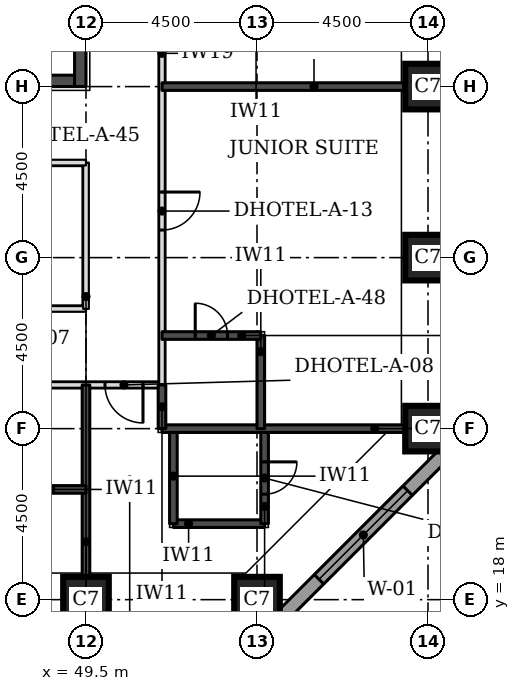
"""IFC4 building model, lengths in metres.
Left out: names, types, materials, properties, quantities, classifications, styles, units other than length and angle.
Written with IfcOpenShell. Run it as: python <this file> out.ifc"""

import sys

from ifc_helpers import new_model, si_unit, direction, frame, frame_2d, origin, origin_2d, place, context, subcontext, project, spatial, rectangle, extrude, element, fill, save


model = new_model("IFC4")
c1 = context("Model", 3, precision=1e-05, world=origin(), true_north=direction((0.0, 1.0)))
c2 = subcontext(c1, "Body", "Model", "MODEL_VIEW")
j1 = project(units=[si_unit("LENGTHUNIT", "METRE"), si_unit("PLANEANGLEUNIT", "RADIAN")], contexts=[c1])
p1 = place(None, origin())
s1 = spatial("IfcSite", under=j1, at=p1, CompositionType="ELEMENT")
p2 = place(p1, origin())
s2 = spatial("IfcBuilding", under=s1, at=p2, CompositionType="ELEMENT")
p3 = place(p2, frame((0.0, 0.0, 26.4)))
s3 = spatial("IfcBuildingStorey", under=s2, at=p3, CompositionType="ELEMENT", Elevation=26.4)
for number, where, z_axis, x_axis in (
    (1, (49.5, 18.0, 0.0), (0.0, 0.0, 1.0), (1.0, 0.0, 0.0)),
    (2, (54.0, 18.0, 0.0), (0.0, 0.0, 1.0), (1.0, 0.0, 0.0)),
    (3, (58.5, 22.5, 0.0), (0.0, 0.0, 1.0), (1.0, 0.0, 0.0)),
    (4, (58.5, 27.0, 0.0), (0.0, 0.0, 1.0), (1.0, 0.0, 0.0)),
    (5, (58.5, 31.5, 0.0), (0.0, 0.0, 1.0), (1.0, 0.0, 0.0)),
):
    element("IfcColumn", number, at=place(p3, frame(where, z_axis=z_axis, x_axis=x_axis)), inside=s3, PredefinedType="COLUMN", context=c2, shape_type="SweptSolid", body=[
        extrude(rectangle(XDim=1.2, YDim=1.2, at=origin_2d()), origin(), (0.0, 0.0, 1.0), 3.3),
    ])
p4 = place(p3, frame((40.8, 31.65, 0.0), z_axis=(0.0, 0.0, 1.0), x_axis=(1.0, 0.0, 0.0)))
e6 = element("IfcWall", 6, at=p4, inside=s3, PredefinedType="SHEAR", context=c2, shape_type="SweptSolid", body=[
    extrude(rectangle(XDim=8.4, YDim=0.3, at=frame_2d((4.2, 0.0))), origin(), (0.0, 0.0, 1.0), 3.3),
])
p5 = place(p4, frame((5.2, 0.0, 0.0)))
e7 = element("IfcOpeningElement", 7, at=p5, cuts=e6, PredefinedType="OPENING", context=c2, shape_type="SweptSolid", body=[
    extrude(rectangle(XDim=1.0, YDim=2.1, at=frame_2d((0.5, 1.05))), frame((0.0, 0.16, 0.0), z_axis=(0.0, -1.0, 0.0), x_axis=(1.0, 0.0, 0.0)), (0.0, 0.0, 1.0), 0.32),
])
p6 = place(p3, frame((49.35, 31.5, 0.0), z_axis=(0.0, 0.0, 1.0), x_axis=(0.0, 1.0, 0.0)))
e8 = element("IfcWall", 8, at=p6, inside=s3, PredefinedType="SHEAR", context=c2, shape_type="SweptSolid", body=[
    extrude(rectangle(XDim=9.0, YDim=0.3, at=frame_2d((4.5, 0.0))), origin(), (0.0, 0.0, 1.0), 3.3),
])
p7 = place(p3, frame((54.27, 17.174, 0.0), z_axis=(0.0, 0.0, 1.0), x_axis=(0.707106781187, 0.707106781187, 0.0)))
e9 = element("IfcWall", 9, at=p7, inside=s3, PredefinedType="STANDARD", context=c2, shape_type="SweptSolid", body=[
    extrude(rectangle(XDim=7.151, YDim=0.35, at=frame_2d((3.576, 0.0))), origin(), (0.0, 0.0, 1.0), 3.055),
])
p8 = place(p7, frame((1.926, 0.0, 0.8)))
e10 = element("IfcOpeningElement", 10, at=p8, cuts=e9, PredefinedType="OPENING", context=c2, shape_type="SweptSolid", body=[
    extrude(rectangle(XDim=3.3, YDim=1.5, at=frame_2d((1.65, 0.75))), frame((0.0, 0.185, 0.0), z_axis=(0.0, -1.0, 0.0), x_axis=(1.0, 0.0, 0.0)), (0.0, 0.0, 1.0), 0.37),
])
p9 = place(p3, frame((19.15, 23.65, 0.0), z_axis=(0.0, 0.0, 1.0), x_axis=(1.0, 0.0, 0.0)))
e11 = element("IfcWall", 11, at=p9, inside=s3, PredefinedType="PARTITIONING", context=c2, shape_type="SweptSolid", body=[
    extrude(rectangle(XDim=32.35, YDim=0.15, at=frame_2d((16.175, 0.0))), origin(), (0.0, 0.0, 1.0), 3.08),
])
p10 = place(p9, frame((6.275, 0.0, 0.0)))
e12 = element("IfcOpeningElement", 12, at=p10, cuts=e11, PredefinedType="OPENING", context=c2, shape_type="SweptSolid", body=[
    extrude(rectangle(XDim=1.0, YDim=2.1, at=frame_2d((0.5, 1.05))), frame((0.0, 0.085, 0.0), z_axis=(0.0, -1.0, 0.0), x_axis=(1.0, 0.0, 0.0)), (0.0, 0.0, 1.0), 0.17),
])
p11 = place(p9, frame((8.675, 0.0, 0.0)))
e13 = element("IfcOpeningElement", 13, at=p11, cuts=e11, PredefinedType="OPENING", context=c2, shape_type="SweptSolid", body=[
    extrude(rectangle(XDim=1.0, YDim=2.1, at=frame_2d((0.5, 1.05))), frame((0.0, 0.085, 0.0), z_axis=(0.0, -1.0, 0.0), x_axis=(1.0, 0.0, 0.0)), (0.0, 0.0, 1.0), 0.17),
])
p12 = place(p9, frame((15.25, 0.0, 0.0)))
e14 = element("IfcOpeningElement", 14, at=p12, cuts=e11, PredefinedType="OPENING", context=c2, shape_type="SweptSolid", body=[
    extrude(rectangle(XDim=1.0, YDim=2.1, at=frame_2d((0.5, 1.05))), frame((0.0, 0.085, 0.0), z_axis=(0.0, -1.0, 0.0), x_axis=(1.0, 0.0, 0.0)), (0.0, 0.0, 1.0), 0.17),
])
p13 = place(p9, frame((17.675, 0.0, 0.0)))
e15 = element("IfcOpeningElement", 15, at=p13, cuts=e11, PredefinedType="OPENING", context=c2, shape_type="SweptSolid", body=[
    extrude(rectangle(XDim=1.0, YDim=2.1, at=frame_2d((0.5, 1.05))), frame((0.0, 0.085, 0.0), z_axis=(0.0, -1.0, 0.0), x_axis=(1.0, 0.0, 0.0)), (0.0, 0.0, 1.0), 0.17),
])
p14 = place(p9, frame((24.275, 0.0, 0.0)))
e16 = element("IfcOpeningElement", 16, at=p14, cuts=e11, PredefinedType="OPENING", context=c2, shape_type="SweptSolid", body=[
    extrude(rectangle(XDim=1.0, YDim=2.1, at=frame_2d((0.5, 1.05))), frame((0.0, 0.085, 0.0), z_axis=(0.0, -1.0, 0.0), x_axis=(1.0, 0.0, 0.0)), (0.0, 0.0, 1.0), 0.17),
])
p15 = place(p9, frame((26.675, 0.0, 0.0)))
e17 = element("IfcOpeningElement", 17, at=p15, cuts=e11, PredefinedType="OPENING", context=c2, shape_type="SweptSolid", body=[
    extrude(rectangle(XDim=1.0, YDim=2.1, at=frame_2d((0.5, 1.05))), frame((0.0, 0.085, 0.0), z_axis=(0.0, -1.0, 0.0), x_axis=(1.0, 0.0, 0.0)), (0.0, 0.0, 1.0), 0.17),
])
p16 = place(p9, frame((1.175, 0.0, 0.0)))
e18 = element("IfcOpeningElement", 18, at=p16, cuts=e11, PredefinedType="OPENING", context=c2, shape_type="SweptSolid", body=[
    extrude(rectangle(XDim=1.0, YDim=2.1, at=frame_2d((0.5, 1.05))), frame((0.0, 0.085, 0.0), z_axis=(0.0, -1.0, 0.0), x_axis=(1.0, 0.0, 0.0)), (0.0, 0.0, 1.0), 0.17),
])
p17 = place(p9, frame((30.85, 0.0, 0.0)))
e19 = element("IfcOpeningElement", 19, at=p17, cuts=e11, PredefinedType="OPENING", context=c2, shape_type="SweptSolid", body=[
    extrude(rectangle(XDim=1.0, YDim=2.1, at=frame_2d((0.5, 1.05))), frame((0.0, 0.085, 0.0), z_axis=(0.0, -1.0, 0.0), x_axis=(1.0, 0.0, 0.0)), (0.0, 0.0, 1.0), 0.17),
])
p18 = place(p3, frame((51.5, 23.65, 0.0), z_axis=(0.0, 0.0, 1.0), x_axis=(0.0, 1.0, 0.0)))
e20 = element("IfcWall", 20, at=p18, inside=s3, PredefinedType="PARTITIONING", context=c2, shape_type="SweptSolid", body=[
    extrude(rectangle(XDim=23.85, YDim=0.15, at=frame_2d((11.925, 0.0))), origin(), (0.0, 0.0, 1.0), 3.08),
])
p19 = place(p18, frame((4.075, 0.0, 0.0)))
e21 = element("IfcOpeningElement", 21, at=p19, cuts=e20, PredefinedType="OPENING", context=c2, shape_type="SweptSolid", body=[
    extrude(rectangle(XDim=1.0, YDim=2.1, at=frame_2d((0.5, 1.05))), frame((0.0, 0.085, 0.0), z_axis=(0.0, -1.0, 0.0), x_axis=(1.0, 0.0, 0.0)), (0.0, 0.0, 1.0), 0.17),
])
p20 = place(p18, frame((10.375, 0.0, 0.0)))
e22 = element("IfcOpeningElement", 22, at=p20, cuts=e20, PredefinedType="OPENING", context=c2, shape_type="SweptSolid", body=[
    extrude(rectangle(XDim=1.0, YDim=2.1, at=frame_2d((0.5, 1.05))), frame((0.0, 0.085, 0.0), z_axis=(0.0, -1.0, 0.0), x_axis=(1.0, 0.0, 0.0)), (0.0, 0.0, 1.0), 0.17),
])
p21 = place(p18, frame((19.9, 0.0, 0.0)))
e23 = element("IfcOpeningElement", 23, at=p21, cuts=e20, PredefinedType="OPENING", context=c2, shape_type="SweptSolid", body=[
    extrude(rectangle(XDim=0.9, YDim=2.1, at=frame_2d((0.45, 1.05))), frame((0.0, 0.085, 0.0), z_axis=(0.0, -1.0, 0.0), x_axis=(1.0, 0.0, 0.0)), (0.0, 0.0, 1.0), 0.17),
])
p22 = place(p3, frame((40.5, 25.65, 0.0), z_axis=(0.0, 0.0, 1.0), x_axis=(1.0, 0.0, 0.0)))
e24 = element("IfcWall", 24, at=p22, inside=s3, PredefinedType="PARTITIONING", context=c2, shape_type="SweptSolid", body=[
    extrude(rectangle(XDim=9.0, YDim=0.15, at=frame_2d((4.5, 0.0))), origin(), (0.0, 0.0, 1.0), 3.08),
])
p23 = place(p3, frame((49.5, 25.65, 0.0), z_axis=(0.0, 0.0, 1.0), x_axis=(0.0, 1.0, 0.0)))
e25 = element("IfcWall", 25, at=p23, inside=s3, PredefinedType="PARTITIONING", context=c2, shape_type="SweptSolid", body=[
    extrude(rectangle(XDim=3.85, YDim=0.15, at=frame_2d((1.925, 0.0))), origin(), (0.0, 0.0, 1.0), 3.08),
])
p24 = place(p3, frame((40.5, 29.5, 0.0), z_axis=(0.0, 0.0, 1.0), x_axis=(1.0, 0.0, 0.0)))
e26 = element("IfcWall", 26, at=p24, inside=s3, PredefinedType="PARTITIONING", context=c2, shape_type="SweptSolid", body=[
    extrude(rectangle(XDim=9.0, YDim=0.15, at=frame_2d((4.5, 0.0))), origin(), (0.0, 0.0, 1.0), 3.08),
])
p25 = place(p24, frame((4.05, 0.0, 0.0)))
e27 = element("IfcOpeningElement", 27, at=p25, cuts=e26, PredefinedType="OPENING", context=c2, shape_type="SweptSolid", body=[
    extrude(rectangle(XDim=0.9, YDim=2.1, at=frame_2d((0.45, 1.05))), frame((0.0, 0.085, 0.0), z_axis=(0.0, -1.0, 0.0), x_axis=(1.0, 0.0, 0.0)), (0.0, 0.0, 1.0), 0.17),
])
p26 = place(p3, frame((49.5, 18.6, 0.0), z_axis=(0.0, 0.0, 1.0), x_axis=(0.0, 1.0, 0.0)))
e28 = element("IfcWall", 28, at=p26, inside=s3, PredefinedType="SOLIDWALL", context=c2, shape_type="SweptSolid", body=[
    extrude(rectangle(XDim=5.05, YDim=0.2, at=frame_2d((2.525, 0.0))), origin(), (0.0, 0.0, 1.0), 3.08),
])
p27 = place(p3, frame((51.8, 20.0, 0.0), z_axis=(0.0, 0.0, 1.0), x_axis=(1.0, 0.0, 0.0)))
e29 = element("IfcWall", 29, at=p27, inside=s3, PredefinedType="SOLIDWALL", context=c2, shape_type="SweptSolid", body=[
    extrude(rectangle(XDim=2.4, YDim=0.2, at=frame_2d((1.2, 0.0))), origin(), (0.0, 0.0, 1.0), 3.08),
])
p28 = place(p3, frame((51.8, 20.0, 0.0), z_axis=(0.0, 0.0, 1.0), x_axis=(0.0, 1.0, 0.0)))
e30 = element("IfcWall", 30, at=p28, inside=s3, PredefinedType="SOLIDWALL", context=c2, shape_type="SweptSolid", body=[
    extrude(rectangle(XDim=2.5, YDim=0.2, at=frame_2d((1.25, 0.0))), origin(), (0.0, 0.0, 1.0), 3.08),
])
p29 = place(p3, frame((54.2, 20.0, 0.0), z_axis=(0.0, 0.0, 1.0), x_axis=(0.0, 1.0, 0.0)))
e31 = element("IfcWall", 31, at=p29, inside=s3, PredefinedType="SOLIDWALL", context=c2, shape_type="SweptSolid", body=[
    extrude(rectangle(XDim=2.5, YDim=0.2, at=frame_2d((1.25, 0.0))), origin(), (0.0, 0.0, 1.0), 3.08),
])
p30 = place(p29, frame((0.775, 0.0, 0.0)))
e32 = element("IfcOpeningElement", 32, at=p30, cuts=e31, PredefinedType="OPENING", context=c2, shape_type="SweptSolid", body=[
    extrude(rectangle(XDim=0.85, YDim=2.1, at=frame_2d((0.425, 1.05))), frame((0.0, 0.11, 0.0), z_axis=(0.0, -1.0, 0.0), x_axis=(1.0, 0.0, 0.0)), (0.0, 0.0, 1.0), 0.22),
])
p31 = place(p3, frame((47.65, 20.9, 0.0), z_axis=(0.0, 0.0, 1.0), x_axis=(1.0, 0.0, 0.0)))
e33 = element("IfcWall", 33, at=p31, inside=s3, PredefinedType="SOLIDWALL", context=c2, shape_type="SweptSolid", body=[
    extrude(rectangle(XDim=1.85, YDim=0.2, at=frame_2d((0.925, 0.0))), origin(), (0.0, 0.0, 1.0), 3.08),
])
p32 = place(p3, frame((51.5, 22.5, 0.0), z_axis=(0.0, 0.0, 1.0), x_axis=(1.0, 0.0, 0.0)))
e34 = element("IfcWall", 34, at=p32, inside=s3, PredefinedType="SOLIDWALL", context=c2, shape_type="SweptSolid", body=[
    extrude(rectangle(XDim=6.4, YDim=0.2, at=frame_2d((3.2, 0.0))), origin(), (0.0, 0.0, 1.0), 3.08),
])
p33 = place(p3, frame((51.5, 22.5, 0.0), z_axis=(0.0, 0.0, 1.0), x_axis=(0.0, 1.0, 0.0)))
e35 = element("IfcWall", 35, at=p33, inside=s3, PredefinedType="SOLIDWALL", context=c2, shape_type="SweptSolid", body=[
    extrude(rectangle(XDim=1.15, YDim=0.2, at=frame_2d((0.575, 0.0))), origin(), (0.0, 0.0, 1.0), 3.08),
])
p34 = place(p3, frame((54.1, 22.5, 0.0), z_axis=(0.0, 0.0, 1.0), x_axis=(0.0, 1.0, 0.0)))
e36 = element("IfcWall", 36, at=p34, inside=s3, PredefinedType="SOLIDWALL", context=c2, shape_type="SweptSolid", body=[
    extrude(rectangle(XDim=2.45, YDim=0.2, at=frame_2d((1.225, 0.0))), origin(), (0.0, 0.0, 1.0), 3.08),
])
p35 = place(p3, frame((51.5, 24.95, 0.0), z_axis=(0.0, 0.0, 1.0), x_axis=(1.0, 0.0, 0.0)))
e37 = element("IfcWall", 37, at=p35, inside=s3, PredefinedType="SOLIDWALL", context=c2, shape_type="SweptSolid", body=[
    extrude(rectangle(XDim=2.6, YDim=0.2, at=frame_2d((1.3, 0.0))), origin(), (0.0, 0.0, 1.0), 3.08),
])
p36 = place(p35, frame((0.875, 0.0, 0.0)))
e38 = element("IfcOpeningElement", 38, at=p36, cuts=e37, PredefinedType="OPENING", context=c2, shape_type="SweptSolid", body=[
    extrude(rectangle(XDim=0.85, YDim=2.1, at=frame_2d((0.425, 1.05))), frame((0.0, 0.11, 0.0), z_axis=(0.0, -1.0, 0.0), x_axis=(1.0, 0.0, 0.0)), (0.0, 0.0, 1.0), 0.22),
])
p37 = place(p3, frame((51.5, 31.5, 0.0), z_axis=(0.0, 0.0, 1.0), x_axis=(1.0, 0.0, 0.0)))
e39 = element("IfcWall", 39, at=p37, inside=s3, PredefinedType="SOLIDWALL", context=c2, shape_type="SweptSolid", body=[
    extrude(rectangle(XDim=6.4, YDim=0.2, at=frame_2d((3.2, 0.0))), origin(), (0.0, 0.0, 1.0), 3.08),
])
p38 = place(p8, origin())
e40 = element("IfcWindow", 40, at=p38, inside=s3, PartitioningType="SINGLE_PANEL", PredefinedType="WINDOW", context=c2, shape_type="SweptSolid", body=[
    extrude(rectangle(XDim=3.3, YDim=1.5, at=frame_2d((1.65, 0.75))), frame((0.0, 0.085, 0.0), z_axis=(0.0, -1.0, 0.0), x_axis=(1.0, 0.0, 0.0)), (0.0, 0.0, 1.0), 0.06),
])
fill(e10, e40)
p39 = place(p19, frame((1.0, 0.0, 0.0), z_axis=(0.0, 0.0, 1.0), x_axis=(-1.0, 0.0, 0.0)))
e41 = element("IfcDoor", 41, at=p39, inside=s3, OperationType="SINGLE_SWING_LEFT", PredefinedType="DOOR", context=c2, shape_type="SweptSolid", body=[
    extrude(rectangle(XDim=1.0, YDim=2.1, at=frame_2d((0.5, 1.05))), frame((0.0, 0.025, 0.0), z_axis=(0.0, -1.0, 0.0), x_axis=(1.0, 0.0, 0.0)), (0.0, 0.0, 1.0), 0.05),
])
fill(e21, e41)
p40 = place(p36, origin())
e42 = element("IfcDoor", 42, at=p40, inside=s3, OperationType="SINGLE_SWING_LEFT", PredefinedType="DOOR", context=c2, shape_type="SweptSolid", body=[
    extrude(rectangle(XDim=0.85, YDim=2.1, at=frame_2d((0.425, 1.05))), frame((0.0, 0.025, 0.0), z_axis=(0.0, -1.0, 0.0), x_axis=(1.0, 0.0, 0.0)), (0.0, 0.0, 1.0), 0.05),
])
fill(e38, e42)
p41 = place(p17, frame((1.0, 0.0, 0.0), z_axis=(0.0, 0.0, 1.0), x_axis=(-1.0, 0.0, 0.0)))
e43 = element("IfcDoor", 43, at=p41, inside=s3, OperationType="SINGLE_SWING_LEFT", PredefinedType="DOOR", context=c2, shape_type="SweptSolid", body=[
    extrude(rectangle(XDim=1.0, YDim=2.1, at=frame_2d((0.5, 1.05))), frame((0.0, 0.025, 0.0), z_axis=(0.0, -1.0, 0.0), x_axis=(1.0, 0.0, 0.0)), (0.0, 0.0, 1.0), 0.05),
])
fill(e19, e43)
p42 = place(p30, frame((0.85, 0.0, 0.0), z_axis=(0.0, 0.0, 1.0), x_axis=(-1.0, 0.0, 0.0)))
e44 = element("IfcDoor", 44, at=p42, inside=s3, OperationType="SINGLE_SWING_LEFT", PredefinedType="DOOR", context=c2, shape_type="SweptSolid", body=[
    extrude(rectangle(XDim=0.85, YDim=2.1, at=frame_2d((0.425, 1.05))), frame((0.0, 0.025, 0.0), z_axis=(0.0, -1.0, 0.0), x_axis=(1.0, 0.0, 0.0)), (0.0, 0.0, 1.0), 0.05),
])
fill(e32, e44)
save(model, sys.argv[1])
